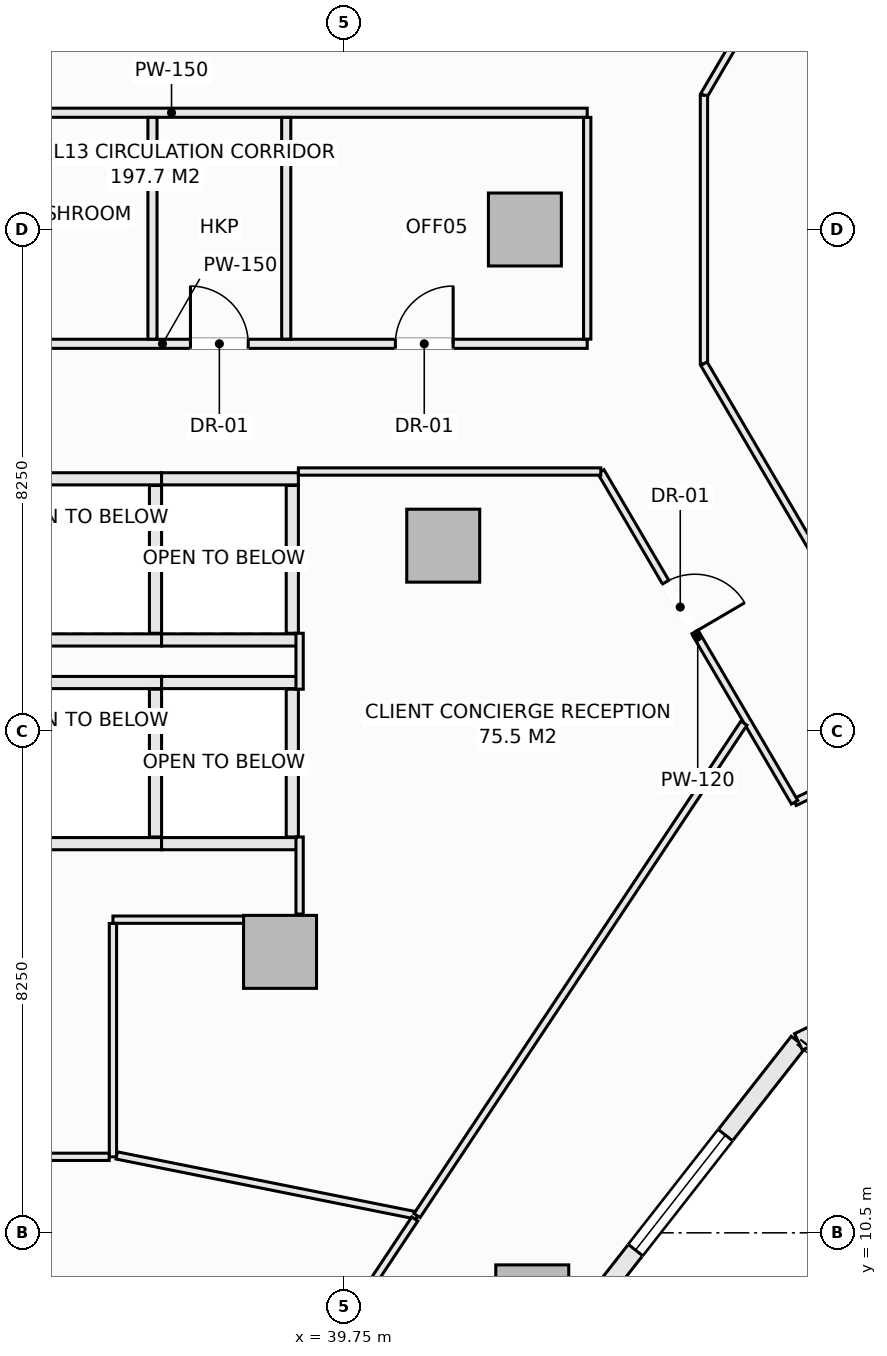
"""IFC4 building model, lengths in metres.
Left out: names, types, materials, properties, quantities, classifications, styles, units other than length and angle.
Written with IfcOpenShell. Run it as: python <this file> out.ifc"""

import sys

from ifc_helpers import new_model, si_unit, direction, frame, frame_2d, origin, origin_2d, place, context, subcontext, project, spatial, rectangle, extrude, element, fill, save


model = new_model("IFC4")
c1 = context("Model", 3, precision=1e-05, world=origin(), true_north=direction((0.0, 1.0)))
c2 = subcontext(c1, "Body", "Model", "MODEL_VIEW")
j1 = project(units=[si_unit("LENGTHUNIT", "METRE"), si_unit("PLANEANGLEUNIT", "RADIAN")], contexts=[c1])
p1 = place(None, origin())
s1 = spatial("IfcSite", under=j1, at=p1, CompositionType="ELEMENT")
p2 = place(p1, origin())
s2 = spatial("IfcBuilding", under=s1, at=p2, CompositionType="ELEMENT")
p3 = place(p2, frame((0.0, 0.0, 57.3)))
s3 = spatial("IfcBuildingStorey", under=s2, at=p3, CompositionType="ELEMENT", Elevation=57.3)
for number, where, z_axis, x_axis in (
    (1, (42.846, 9.373, -0.28), (0.0, 0.0, 1.0), (1.0, 0.0, 0.0)),
    (2, (42.725, 27.0, -0.28), (0.0, 0.0, 1.0), (1.0, 0.0, 0.0)),
    (3, (38.698, 15.121, -0.28), (0.0, 0.0, 1.0), (1.0, 0.0, 0.0)),
    (4, (41.382, 21.801, -0.28), (0.0, 0.0, 1.0), (1.0, 0.0, 0.0)),
):
    element("IfcColumn", number, at=place(p3, frame(where, z_axis=z_axis, x_axis=x_axis)), inside=s3, PredefinedType="COLUMN", context=c2, shape_type="SweptSolid", body=[
        extrude(rectangle(XDim=1.2, YDim=1.2, at=origin_2d()), origin(), (0.0, 0.0, 1.0), 3.85),
    ])
p4 = place(p3, frame((43.344, 8.684, 0.0), z_axis=(0.0, 0.0, 1.0), x_axis=(0.616434798832, 0.78740595552, 0.0)))
e5 = element("IfcWall", 5, at=p4, inside=s3, PredefinedType="SOLIDWALL", context=c2, shape_type="SweptSolid", body=[
    extrude(rectangle(XDim=6.294, YDim=0.3, at=frame_2d((3.147, 0.0))), origin(), (0.0, 0.0, 1.0), 3.093),
])
p5 = place(p4, frame((1.947, 0.0, 0.85)))
e6 = element("IfcOpeningElement", 6, at=p5, cuts=e5, PredefinedType="OPENING", context=c2, shape_type="SweptSolid", body=[
    extrude(rectangle(XDim=2.4, YDim=1.9, at=frame_2d((1.2, 0.95))), frame((0.0, 0.16, 0.0), z_axis=(0.0, -1.0, 0.0), x_axis=(1.0, 0.0, 0.0)), (0.0, 0.0, 1.0), 0.32),
])
p6 = place(p3, frame((47.224, 13.64, 0.0), z_axis=(0.0, 0.0, 1.0), x_axis=(0.901354747727, 0.433081538224, 0.0)))
e7 = element("IfcWall", 7, at=p6, inside=s3, PredefinedType="SOLIDWALL", context=c2, shape_type="SweptSolid", body=[
    extrude(rectangle(XDim=6.431, YDim=0.3, at=frame_2d((3.215, 0.0))), origin(), (0.0, 0.0, 1.0), 3.093),
])
p7 = place(p6, frame((2.015, 0.0, 0.85)))
e8 = element("IfcOpeningElement", 8, at=p7, cuts=e7, PredefinedType="OPENING", context=c2, shape_type="SweptSolid", body=[
    extrude(rectangle(XDim=2.4, YDim=1.9, at=frame_2d((1.2, 0.95))), frame((0.0, 0.16, 0.0), z_axis=(0.0, -1.0, 0.0), x_axis=(1.0, 0.0, 0.0)), (0.0, 0.0, 1.0), 0.32),
])
for number, where, z_axis, x_axis in (
    (9, (34.5, 19.55, 0.0), (0.0, 0.0, 1.0), (1.0, 0.0, 0.0)),
    (10, (34.5, 16.9, 0.0), (0.0, 0.0, 1.0), (1.0, 0.0, 0.0)),
):
    element("IfcWall", number, at=place(p3, frame(where, z_axis=z_axis, x_axis=x_axis)), inside=s3, PredefinedType="SOLIDWALL", context=c2, shape_type="SweptSolid", body=[
        extrude(rectangle(XDim=2.25, YDim=0.2, at=frame_2d((1.125, 0.0))), origin(), (0.0, 0.0, 1.0), 3.57),
    ])
p8 = place(p3, frame((36.65, 17.01, 0.0), z_axis=(0.0, 0.0, 1.0), x_axis=(0.0, 1.0, 0.0)))
e11 = element("IfcWall", 11, at=p8, inside=s3, PredefinedType="SOLIDWALL", context=c2, shape_type="SweptSolid", body=[
    extrude(rectangle(XDim=2.43, YDim=0.2, at=frame_2d((1.215, 0.0))), origin(), (0.0, 0.0, 1.0), 3.57),
])
for number, where, z_axis, x_axis in (
    (12, (36.75, 19.55, 0.0), (0.0, 0.0, 1.0), (1.0, 0.0, 0.0)),
    (13, (36.75, 16.9, 0.0), (0.0, 0.0, 1.0), (1.0, 0.0, 0.0)),
):
    element("IfcWall", number, at=place(p3, frame(where, z_axis=z_axis, x_axis=x_axis)), inside=s3, PredefinedType="SOLIDWALL", context=c2, shape_type="SweptSolid", body=[
        extrude(rectangle(XDim=2.25, YDim=0.2, at=frame_2d((1.125, 0.0))), origin(), (0.0, 0.0, 1.0), 3.57),
    ])
p9 = place(p3, frame((38.9, 17.01, 0.0), z_axis=(0.0, 0.0, 1.0), x_axis=(0.0, 1.0, 0.0)))
e14 = element("IfcWall", 14, at=p9, inside=s3, PredefinedType="SOLIDWALL", context=c2, shape_type="SweptSolid", body=[
    extrude(rectangle(XDim=2.43, YDim=0.2, at=frame_2d((1.215, 0.0))), origin(), (0.0, 0.0, 1.0), 3.57),
])
for number, where, z_axis, x_axis in (
    (15, (34.5, 22.9, 0.0), (0.0, 0.0, 1.0), (1.0, 0.0, 0.0)),
    (16, (34.5, 20.25, 0.0), (0.0, 0.0, 1.0), (1.0, 0.0, 0.0)),
):
    element("IfcWall", number, at=place(p3, frame(where, z_axis=z_axis, x_axis=x_axis)), inside=s3, PredefinedType="SOLIDWALL", context=c2, shape_type="SweptSolid", body=[
        extrude(rectangle(XDim=2.25, YDim=0.2, at=frame_2d((1.125, 0.0))), origin(), (0.0, 0.0, 1.0), 3.57),
    ])
p10 = place(p3, frame((36.65, 20.36, 0.0), z_axis=(0.0, 0.0, 1.0), x_axis=(0.0, 1.0, 0.0)))
e17 = element("IfcWall", 17, at=p10, inside=s3, PredefinedType="SOLIDWALL", context=c2, shape_type="SweptSolid", body=[
    extrude(rectangle(XDim=2.43, YDim=0.2, at=frame_2d((1.215, 0.0))), origin(), (0.0, 0.0, 1.0), 3.57),
])
for number, where, z_axis, x_axis in (
    (18, (36.75, 22.9, 0.0), (0.0, 0.0, 1.0), (1.0, 0.0, 0.0)),
    (19, (36.75, 20.25, 0.0), (0.0, 0.0, 1.0), (1.0, 0.0, 0.0)),
):
    element("IfcWall", number, at=place(p3, frame(where, z_axis=z_axis, x_axis=x_axis)), inside=s3, PredefinedType="SOLIDWALL", context=c2, shape_type="SweptSolid", body=[
        extrude(rectangle(XDim=2.25, YDim=0.2, at=frame_2d((1.125, 0.0))), origin(), (0.0, 0.0, 1.0), 3.57),
    ])
p11 = place(p3, frame((38.9, 20.36, 0.0), z_axis=(0.0, 0.0, 1.0), x_axis=(0.0, 1.0, 0.0)))
e20 = element("IfcWall", 20, at=p11, inside=s3, PredefinedType="SOLIDWALL", context=c2, shape_type="SweptSolid", body=[
    extrude(rectangle(XDim=2.43, YDim=0.2, at=frame_2d((1.215, 0.0))), origin(), (0.0, 0.0, 1.0), 3.57),
])
p12 = place(p3, frame((29.78, 25.12, 0.0), z_axis=(0.0, 0.0, 1.0), x_axis=(1.0, 0.0, 0.0)))
e21 = element("IfcWall", 21, at=p12, inside=s3, PredefinedType="PARTITIONING", context=c2, shape_type="SweptSolid", body=[
    extrude(rectangle(XDim=13.97, YDim=0.15, at=frame_2d((6.985, 0.0))), origin(), (0.0, 0.0, 1.0), 3.57),
])
p13 = place(p12, frame((3.14, 0.0, 0.0)))
e22 = element("IfcOpeningElement", 22, at=p13, cuts=e21, PredefinedType="OPENING", context=c2, shape_type="SweptSolid", body=[
    extrude(rectangle(XDim=0.95, YDim=2.1, at=frame_2d((0.475, 1.05))), frame((0.0, 0.085, 0.0), z_axis=(0.0, -1.0, 0.0), x_axis=(1.0, 0.0, 0.0)), (0.0, 0.0, 1.0), 0.17),
])
p14 = place(p12, frame((7.445, 0.0, 0.0)))
e23 = element("IfcOpeningElement", 23, at=p14, cuts=e21, PredefinedType="OPENING", context=c2, shape_type="SweptSolid", body=[
    extrude(rectangle(XDim=0.95, YDim=2.1, at=frame_2d((0.475, 1.05))), frame((0.0, 0.085, 0.0), z_axis=(0.0, -1.0, 0.0), x_axis=(1.0, 0.0, 0.0)), (0.0, 0.0, 1.0), 0.17),
])
p15 = place(p12, frame((10.815, 0.0, 0.0)))
e24 = element("IfcOpeningElement", 24, at=p15, cuts=e21, PredefinedType="OPENING", context=c2, shape_type="SweptSolid", body=[
    extrude(rectangle(XDim=0.95, YDim=2.1, at=frame_2d((0.475, 1.05))), frame((0.0, 0.085, 0.0), z_axis=(0.0, -1.0, 0.0), x_axis=(1.0, 0.0, 0.0)), (0.0, 0.0, 1.0), 0.17),
])
p16 = place(p3, frame((30.077, 28.92, 0.0), z_axis=(0.0, 0.0, 1.0), x_axis=(1.0, 0.0, 0.0)))
e25 = element("IfcWall", 25, at=p16, inside=s3, PredefinedType="PARTITIONING", context=c2, shape_type="SweptSolid", body=[
    extrude(rectangle(XDim=13.673, YDim=0.15, at=frame_2d((6.836, 0.0))), origin(), (0.0, 0.0, 1.0), 3.57),
])
for number, where, z_axis, x_axis in (
    (26, (36.6, 25.197, 0.0), (0.0, 0.0, 1.0), (0.0, 1.0, 0.0)),
    (27, (38.8, 25.197, 0.0), (0.0, 0.0, 1.0), (0.0, 1.0, 0.0)),
):
    element("IfcWall", number, at=place(p3, frame(where, z_axis=z_axis, x_axis=x_axis)), inside=s3, PredefinedType="PARTITIONING", context=c2, shape_type="SweptSolid", body=[
        extrude(rectangle(XDim=3.646, YDim=0.15, at=frame_2d((1.823, 0.0))), origin(), (0.0, 0.0, 1.0), 3.57),
    ])
p17 = place(p3, frame((35.95, 15.65, 0.0), z_axis=(0.0, 0.0, 1.0), x_axis=(1.0, 0.0, 0.0)))
e28 = element("IfcWall", 28, at=p17, inside=s3, PredefinedType="PARTITIONING", context=c2, shape_type="SweptSolid", body=[
    extrude(rectangle(XDim=2.291, YDim=0.12, at=frame_2d((1.146, 0.0))), origin(), (0.0, 0.0, 1.0), 3.57),
])
p18 = place(p3, frame((35.95, 11.75, 0.0), z_axis=(0.0, 0.0, 1.0), x_axis=(0.0, 1.0, 0.0)))
e29 = element("IfcWall", 29, at=p18, inside=s3, PredefinedType="PARTITIONING", context=c2, shape_type="SweptSolid", body=[
    extrude(rectangle(XDim=3.838, YDim=0.12, at=frame_2d((1.919, 0.0))), origin(), (0.0, 0.0, 1.0), 3.57),
])
p19 = place(p3, frame((27.227, 11.75, 0.0), z_axis=(0.0, 0.0, 1.0), x_axis=(1.0, 0.0, 0.0)))
e30 = element("IfcWall", 30, at=p19, inside=s3, PredefinedType="PARTITIONING", context=c2, shape_type="SweptSolid", body=[
    extrude(rectangle(XDim=8.661, YDim=0.12, at=frame_2d((4.331, 0.0))), origin(), (0.0, 0.0, 1.0), 3.57),
])
p20 = place(p19, frame((5.206, 0.0, 0.0)))
e31 = element("IfcOpeningElement", 31, at=p20, cuts=e30, PredefinedType="OPENING", context=c2, shape_type="SweptSolid", body=[
    extrude(rectangle(XDim=0.95, YDim=2.1, at=frame_2d((0.475, 1.05))), frame((0.0, 0.07, 0.0), z_axis=(0.0, -1.0, 0.0), x_axis=(1.0, 0.0, 0.0)), (0.0, 0.0, 1.0), 0.14),
])
p21 = place(p3, frame((45.67, 29.207, 0.0), z_axis=(0.0, 0.0, 1.0), x_axis=(0.505582857323, 0.86277805627, 0.0)))
e32 = element("IfcWall", 32, at=p21, inside=s3, PredefinedType="PARTITIONING", context=c2, shape_type="SweptSolid", body=[
    extrude(rectangle(XDim=7.108, YDim=0.12, at=frame_2d((3.554, 0.0))), origin(), (0.0, 0.0, 1.0), 3.57),
])
p22 = place(p21, frame((2.695, 0.0, 0.0)))
e33 = element("IfcOpeningElement", 33, at=p22, cuts=e32, PredefinedType="OPENING", context=c2, shape_type="SweptSolid", body=[
    extrude(rectangle(XDim=0.95, YDim=2.1, at=frame_2d((0.475, 1.05))), frame((0.0, 0.07, 0.0), z_axis=(0.0, -1.0, 0.0), x_axis=(1.0, 0.0, 0.0)), (0.0, 0.0, 1.0), 0.14),
])
p23 = place(p3, frame((45.67, 24.793, 0.0), z_axis=(0.0, 0.0, 1.0), x_axis=(0.0, 1.0, 0.0)))
e34 = element("IfcWall", 34, at=p23, inside=s3, PredefinedType="PARTITIONING", context=c2, shape_type="SweptSolid", body=[
    extrude(rectangle(XDim=4.414, YDim=0.12, at=frame_2d((2.207, 0.0))), origin(), (0.0, 0.0, 1.0), 3.57),
])
p24 = place(p3, frame((45.67, 24.793, 0.0), z_axis=(0.0, 0.0, 1.0), x_axis=(0.505584917928, -0.862776848764, 0.0)))
e35 = element("IfcWall", 35, at=p24, inside=s3, PredefinedType="PARTITIONING", context=c2, shape_type="SweptSolid", body=[
    extrude(rectangle(XDim=7.17, YDim=0.12, at=frame_2d((3.585, 0.0))), origin(), (0.0, 0.0, 1.0), 3.57),
])
p25 = place(p24, frame((5.016, 0.0, 0.0)))
e36 = element("IfcOpeningElement", 36, at=p25, cuts=e35, PredefinedType="OPENING", context=c2, shape_type="SweptSolid", body=[
    extrude(rectangle(XDim=0.95, YDim=2.1, at=frame_2d((0.475, 1.05))), frame((0.0, 0.07, 0.0), z_axis=(0.0, -1.0, 0.0), x_axis=(1.0, 0.0, 0.0)), (0.0, 0.0, 1.0), 0.14),
])
p26 = place(p3, frame((47.161, 17.581, 0.0), z_axis=(0.0, 0.0, 1.0), x_axis=(0.901265146481, 0.433267972204, 0.0)))
e37 = element("IfcWall", 37, at=p26, inside=s3, PredefinedType="PARTITIONING", context=c2, shape_type="SweptSolid", body=[
    extrude(rectangle(XDim=2.306, YDim=0.12, at=frame_2d((1.153, 0.0))), origin(), (0.0, 0.0, 1.0), 3.57),
])
p27 = place(p3, frame((43.974, 23.02, 0.0), z_axis=(0.0, 0.0, 1.0), x_axis=(0.505531634194, -0.862808070679, 0.0)))
e38 = element("IfcWall", 38, at=p27, inside=s3, PredefinedType="PARTITIONING", context=c2, shape_type="SweptSolid", body=[
    extrude(rectangle(XDim=6.304, YDim=0.12, at=frame_2d((3.152, 0.0))), origin(), (0.0, 0.0, 1.0), 3.205),
])
p28 = place(p27, frame((2.109, 0.0, 0.0)))
e39 = element("IfcOpeningElement", 39, at=p28, cuts=e38, PredefinedType="OPENING", context=c2, shape_type="SweptSolid", body=[
    extrude(rectangle(XDim=0.95, YDim=2.1, at=frame_2d((0.475, 1.05))), frame((0.0, 0.07, 0.0), z_axis=(0.0, -1.0, 0.0), x_axis=(1.0, 0.0, 0.0)), (0.0, 0.0, 1.0), 0.14),
])
p29 = place(p3, frame((39.0, 23.02, 0.0), z_axis=(0.0, 0.0, 1.0), x_axis=(1.0, 0.0, 0.0)))
e40 = element("IfcWall", 40, at=p29, inside=s3, PredefinedType="PARTITIONING", context=c2, shape_type="SweptSolid", body=[
    extrude(rectangle(XDim=4.974, YDim=0.12, at=frame_2d((2.487, 0.0))), origin(), (0.0, 0.0, 1.0), 3.57),
])
p30 = place(p3, frame((39.02, 15.742, 0.0), z_axis=(0.0, 0.0, 1.0), x_axis=(0.0, 1.0, 0.0)))
e41 = element("IfcWall", 41, at=p30, inside=s3, PredefinedType="PARTITIONING", context=c2, shape_type="SweptSolid", body=[
    extrude(rectangle(XDim=1.268, YDim=0.12, at=frame_2d((0.634, 0.0))), origin(), (0.0, 0.0, 1.0), 2.934),
])
p31 = place(p3, frame((39.02, 19.44, 0.0), z_axis=(0.0, 0.0, 1.0), x_axis=(0.0, 1.0, 0.0)))
e42 = element("IfcWall", 42, at=p31, inside=s3, PredefinedType="PARTITIONING", context=c2, shape_type="SweptSolid", body=[
    extrude(rectangle(XDim=0.92, YDim=0.12, at=frame_2d((0.46, 0.0))), origin(), (0.0, 0.0, 1.0), 3.57),
])
p32 = place(p3, frame((43.75, 25.197, 0.0), z_axis=(0.0, 0.0, 1.0), x_axis=(0.0, 1.0, 0.0)))
e43 = element("IfcWall", 43, at=p32, inside=s3, PredefinedType="PARTITIONING", context=c2, shape_type="SweptSolid", body=[
    extrude(rectangle(XDim=3.646, YDim=0.12, at=frame_2d((1.823, 0.0))), origin(), (0.0, 0.0, 1.0), 3.57),
])
p33 = place(p3, frame((36.012, 11.773, 0.0), z_axis=(0.0, 0.0, 1.0), x_axis=(0.980526579604, -0.196386421855, 0.0)))
e44 = element("IfcWall", 44, at=p33, inside=s3, PredefinedType="PARTITIONING", context=c2, shape_type="SweptSolid", body=[
    extrude(rectangle(XDim=5.037, YDim=0.12, at=frame_2d((2.519, 0.0))), origin(), (0.0, 0.0, 1.0), 3.57),
])
p34 = place(p3, frame((38.625, 7.28, 0.0), z_axis=(0.0, 0.0, 1.0), x_axis=(0.553106233715, 0.833110733471, 0.0)))
e45 = element("IfcWall", 45, at=p34, inside=s3, PredefinedType="PARTITIONING", context=c2, shape_type="SweptSolid", body=[
    extrude(rectangle(XDim=4.138, YDim=0.12, at=frame_2d((2.069, 0.0))), origin(), (0.0, 0.0, 1.0), 3.57),
])
p35 = place(p3, frame((40.951, 10.783, 0.0), z_axis=(0.0, 0.0, 1.0), x_axis=(0.553122636923, 0.83309984307, 0.0)))
e46 = element("IfcWall", 46, at=p35, inside=s3, PredefinedType="PARTITIONING", context=c2, shape_type="SweptSolid", body=[
    extrude(rectangle(XDim=9.72, YDim=0.12, at=frame_2d((4.86, 0.0))), origin(), (0.0, 0.0, 1.0), 3.57),
])
p36 = place(p5, origin())
e47 = element("IfcWindow", 47, at=p36, inside=s3, PartitioningType="SINGLE_PANEL", PredefinedType="WINDOW", context=c2, shape_type="SweptSolid", body=[
    extrude(rectangle(XDim=2.4, YDim=1.9, at=frame_2d((1.2, 0.95))), frame((0.0, 0.03, 0.0), z_axis=(0.0, -1.0, 0.0), x_axis=(1.0, 0.0, 0.0)), (0.0, 0.0, 1.0), 0.06),
])
fill(e6, e47)
p37 = place(p14, origin())
e48 = element("IfcDoor", 48, at=p37, inside=s3, OperationType="SINGLE_SWING_LEFT", PredefinedType="DOOR", context=c2, shape_type="SweptSolid", body=[
    extrude(rectangle(XDim=0.95, YDim=2.1, at=frame_2d((0.475, 1.05))), frame((0.0, 0.025, 0.0), z_axis=(0.0, -1.0, 0.0), x_axis=(1.0, 0.0, 0.0)), (0.0, 0.0, 1.0), 0.05),
])
fill(e23, e48)
p38 = place(p28, origin())
e49 = element("IfcDoor", 49, at=p38, inside=s3, OperationType="SINGLE_SWING_RIGHT", PredefinedType="DOOR", context=c2, shape_type="SweptSolid", body=[
    extrude(rectangle(XDim=0.95, YDim=2.1, at=frame_2d((0.475, 1.05))), frame((0.0, 0.025, 0.0), z_axis=(0.0, -1.0, 0.0), x_axis=(1.0, 0.0, 0.0)), (0.0, 0.0, 1.0), 0.05),
])
fill(e39, e49)
p39 = place(p15, origin())
e50 = element("IfcDoor", 50, at=p39, inside=s3, OperationType="SINGLE_SWING_RIGHT", PredefinedType="DOOR", context=c2, shape_type="SweptSolid", body=[
    extrude(rectangle(XDim=0.95, YDim=2.1, at=frame_2d((0.475, 1.05))), frame((0.0, 0.025, 0.0), z_axis=(0.0, -1.0, 0.0), x_axis=(1.0, 0.0, 0.0)), (0.0, 0.0, 1.0), 0.05),
])
fill(e24, e50)
save(model, sys.argv[1])
